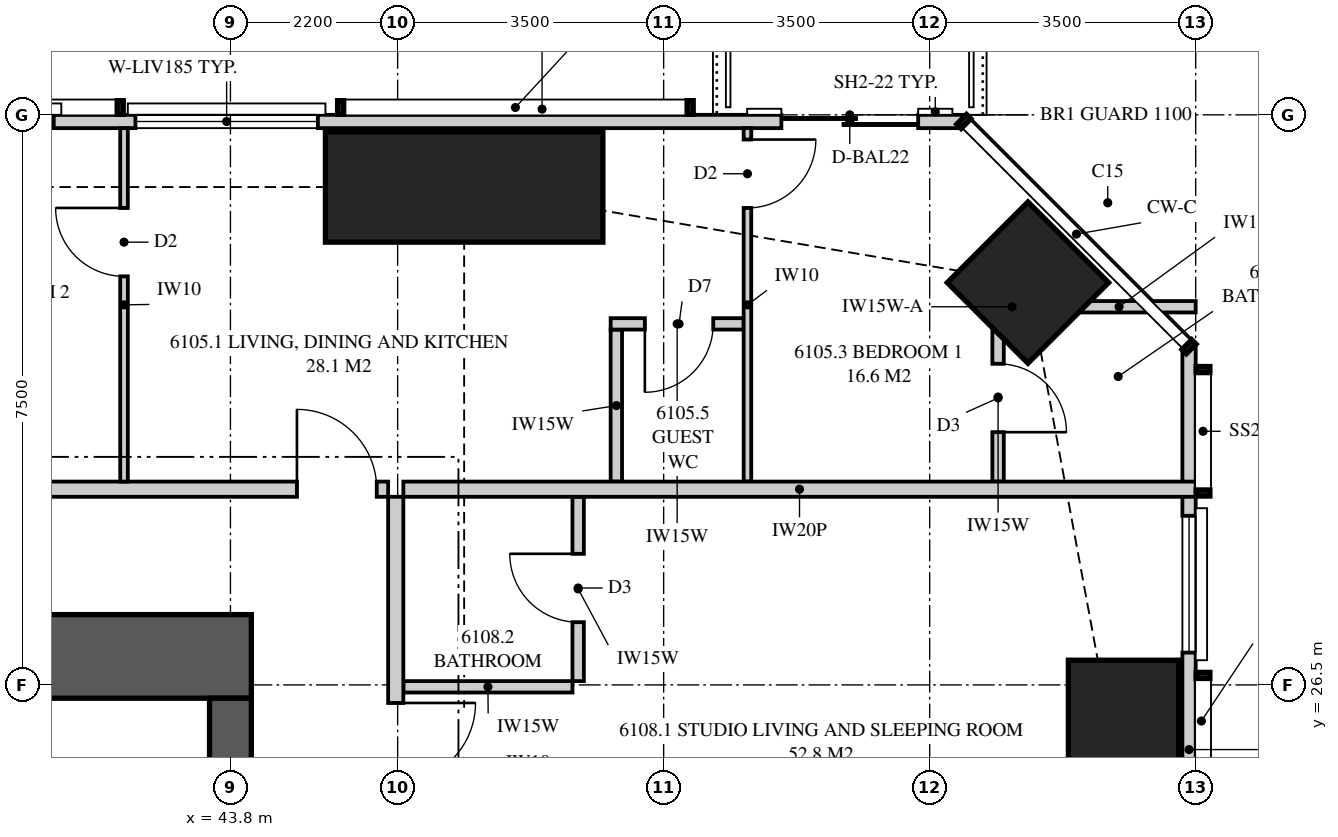
"""IFC4 building model, lengths in metres.
Left out: names, types, materials, properties, quantities, classifications, styles, units other than length and angle.
Written with IfcOpenShell. Run it as: python <this file> out.ifc"""

import sys

from ifc_helpers import new_model, si_unit, direction, frame, frame_2d, origin, origin_2d, place, context, subcontext, project, spatial, polyline, rectangle, outline, extrude, element, fill, save


model = new_model("IFC4")
c1 = context("Model", 3, precision=1e-05, world=origin(), true_north=direction((0.0, 1.0)))
c2 = subcontext(c1, "Body", "Model", "MODEL_VIEW")
j1 = project(units=[si_unit("LENGTHUNIT", "METRE"), si_unit("PLANEANGLEUNIT", "RADIAN")], contexts=[c1])
p1 = place(None, origin())
s1 = spatial("IfcSite", under=j1, at=p1, CompositionType="ELEMENT")
p2 = place(p1, origin())
s2 = spatial("IfcBuilding", under=s1, at=p2, CompositionType="ELEMENT")
p3 = place(p2, frame((0.0, 0.0, 224.95)))
s3 = spatial("IfcBuildingStorey", under=s2, at=p3, CompositionType="ELEMENT", Elevation=224.95)
p4 = place(p3, frame((55.55, 25.0, 0.0), z_axis=(0.0, 0.0, 1.0), x_axis=(1.0, 0.0, 0.0)))
e1 = element("IfcColumn", 1, at=p4, inside=s3, PredefinedType="COLUMN", context=c2, shape_type="SweptSolid", body=[
    extrude(rectangle(XDim=1.45, YDim=3.65, at=origin_2d()), origin(), (0.0, 0.0, 1.0), 3.5),
])
p5 = place(p3, frame((54.293, 31.793, 0.0), z_axis=(0.0, 0.0, 1.0), x_axis=(0.707106781187, 0.707106781187, 0.0)))
e2 = element("IfcColumn", 2, at=p5, inside=s3, PredefinedType="COLUMN", context=c2, shape_type="SweptSolid", body=[
    extrude(rectangle(XDim=1.5, YDim=1.5, at=origin_2d()), origin(), (0.0, 0.0, 1.0), 3.5),
])
p6 = place(p3, frame((46.875, 33.05, 0.0), z_axis=(0.0, 0.0, 1.0), x_axis=(0.0, 1.0, 0.0)))
e3 = element("IfcColumn", 3, at=p6, inside=s3, PredefinedType="COLUMN", context=c2, shape_type="SweptSolid", body=[
    extrude(rectangle(XDim=1.45, YDim=3.65, at=origin_2d()), origin(), (0.0, 0.0, 1.0), 3.5),
])
p7 = place(p3, frame((44.075, 26.875, 0.0), z_axis=(0.0, 0.0, 1.0), x_axis=(-1.0, 0.0, 0.0)))
e4 = element("IfcWall", 4, at=p7, inside=s3, PredefinedType="SHEAR", context=c2, shape_type="SweptSolid", body=[
    extrude(rectangle(XDim=8.175, YDim=1.1, at=frame_2d((4.087, 0.0))), origin(), (0.0, 0.0, 1.0), 3.5),
])
p8 = place(p7, frame((5.575, 0.0, 0.0)))
e5 = element("IfcOpeningElement", 5, at=p8, cuts=e4, PredefinedType="OPENING", context=c2, shape_type="SweptSolid", body=[
    extrude(rectangle(XDim=0.9, YDim=2.1, at=frame_2d((0.45, 1.05))), frame((0.0, 0.56, 0.0), z_axis=(0.0, -1.0, 0.0), x_axis=(1.0, 0.0, 0.0)), (0.0, 0.0, 1.0), 1.12),
])
p9 = place(p3, frame((43.8, 19.3, 0.0), z_axis=(0.0, 0.0, 1.0), x_axis=(0.0, 1.0, 0.0)))
e6 = element("IfcWall", 6, at=p9, inside=s3, PredefinedType="SHEAR", context=c2, shape_type="SweptSolid", body=[
    extrude(rectangle(XDim=7.025, YDim=0.55, at=frame_2d((3.512, 0.0))), origin(), (0.0, 0.0, 1.0), 3.5),
])
p10 = place(p3, frame((56.413, 20.35, 0.0), z_axis=(0.0, 0.0, 1.0), x_axis=(0.0, 1.0, 0.0)))
e7 = element("IfcWall", 7, at=p10, inside=s3, PredefinedType="SOLIDWALL", context=c2, shape_type="SweptSolid", body=[
    extrude(outline(polyline([(0.0, 0.0), (10.599, 0.0), (10.599, 3.26), (4.858, 3.26), (4.858, 2.3), (4.793, 2.3), (4.793, 3.26), (4.65, 3.26), (4.65, 2.3), (0.0, 2.3), (0.0, 0.0)])), frame((0.0, 0.087, 0.0), z_axis=(0.0, -1.0, 0.0), x_axis=(1.0, 0.0, 0.0)), (0.0, 0.0, 1.0), 0.175),
])
p11 = place(p10, frame((6.575, 0.0, 0.4)))
e8 = element("IfcOpeningElement", 8, at=p11, cuts=e7, PredefinedType="OPENING", context=c2, shape_type="SweptSolid", body=[
    extrude(rectangle(XDim=1.8, YDim=1.85, at=frame_2d((0.9, 0.925))), frame((0.0, 0.097, 0.0), z_axis=(0.0, -1.0, 0.0), x_axis=(1.0, 0.0, 0.0)), (0.0, 0.0, 1.0), 0.195),
])
p12 = place(p3, frame((53.449, 33.913, 0.0), z_axis=(0.0, 0.0, 1.0), x_axis=(-1.0, 0.0, 0.0)))
e9 = element("IfcWall", 9, at=p12, inside=s3, PredefinedType="SOLIDWALL", context=c2, shape_type="SweptSolid", body=[
    extrude(outline(polyline([(0.0, 0.0), (33.597, 0.0), (33.597, 3.26), (26.039, 3.26), (26.039, 2.3), (25.955, 2.3), (25.955, 3.26), (25.824, 3.26), (25.824, 2.3), (6.574, 2.3), (6.574, 3.26), (6.442, 3.26), (6.442, 2.3), (6.359, 2.3), (6.359, 3.26), (0.0, 3.26), (0.0, 0.0)])), frame((0.0, 0.087, 0.0), z_axis=(0.0, -1.0, 0.0), x_axis=(1.0, 0.0, 0.0)), (0.0, 0.0, 1.0), 0.175),
])
p13 = place(p12, frame((0.6, 0.0, 0.0)))
e10 = element("IfcOpeningElement", 10, at=p13, cuts=e9, PredefinedType="OPENING", context=c2, shape_type="SweptSolid", body=[
    extrude(rectangle(XDim=1.8, YDim=2.25, at=frame_2d((0.9, 1.125))), frame((0.0, 0.097, 0.0), z_axis=(0.0, -1.0, 0.0), x_axis=(1.0, 0.0, 0.0)), (0.0, 0.0, 1.0), 0.195),
])
p14 = place(p12, frame((8.499, 0.0, 0.4)))
e11 = element("IfcOpeningElement", 11, at=p14, cuts=e9, PredefinedType="OPENING", context=c2, shape_type="SweptSolid", body=[
    extrude(rectangle(XDim=2.4, YDim=1.85, at=frame_2d((1.2, 0.925))), frame((0.0, 0.097, 0.0), z_axis=(0.0, -1.0, 0.0), x_axis=(1.0, 0.0, 0.0)), (0.0, 0.0, 1.0), 0.195),
])
p15 = place(p12, frame((11.974, 0.0, 0.4)))
e12 = element("IfcOpeningElement", 12, at=p15, cuts=e9, PredefinedType="OPENING", context=c2, shape_type="SweptSolid", body=[
    extrude(rectangle(XDim=1.8, YDim=1.85, at=frame_2d((0.9, 0.925))), frame((0.0, 0.097, 0.0), z_axis=(0.0, -1.0, 0.0), x_axis=(1.0, 0.0, 0.0)), (0.0, 0.0, 1.0), 0.195),
])
p16 = place(p12, frame((18.124, 0.0, 0.4)))
e13 = element("IfcOpeningElement", 13, at=p16, cuts=e9, PredefinedType="OPENING", context=c2, shape_type="SweptSolid", body=[
    extrude(rectangle(XDim=1.8, YDim=1.85, at=frame_2d((0.9, 0.925))), frame((0.0, 0.097, 0.0), z_axis=(0.0, -1.0, 0.0), x_axis=(1.0, 0.0, 0.0)), (0.0, 0.0, 1.0), 0.195),
])
p17 = place(p12, frame((21.249, 0.0, 0.4)))
e14 = element("IfcOpeningElement", 14, at=p17, cuts=e9, PredefinedType="OPENING", context=c2, shape_type="SweptSolid", body=[
    extrude(rectangle(XDim=1.8, YDim=1.85, at=frame_2d((0.9, 0.925))), frame((0.0, 0.097, 0.0), z_axis=(0.0, -1.0, 0.0), x_axis=(1.0, 0.0, 0.0)), (0.0, 0.0, 1.0), 0.195),
])
p18 = place(p12, frame((27.76, 0.0, 0.4)))
e15 = element("IfcOpeningElement", 15, at=p18, cuts=e9, PredefinedType="OPENING", context=c2, shape_type="SweptSolid", body=[
    extrude(rectangle(XDim=2.4, YDim=1.85, at=frame_2d((1.2, 0.925))), frame((0.0, 0.097, 0.0), z_axis=(0.0, -1.0, 0.0), x_axis=(1.0, 0.0, 0.0)), (0.0, 0.0, 1.0), 0.195),
])
p19 = place(p3, frame((38.8, 29.075, 0.0), z_axis=(0.0, 0.0, 1.0), x_axis=(1.0, 0.0, 0.0)))
e16 = element("IfcWall", 16, at=p19, inside=s3, PredefinedType="PARTITIONING", context=c2, shape_type="SweptSolid", body=[
    extrude(outline(polyline([(0.0, 0.0), (7.075, 0.0), (7.075, 3.26), (7.075, 2.66), (6.765, 2.66), (6.765, 3.26), (0.0, 3.26), (0.0, 0.0)])), frame((0.0, 0.1, 0.0), z_axis=(0.0, -1.0, 0.0), x_axis=(1.0, 0.0, 0.0)), (0.0, 0.0, 1.0), 0.2),
])
p20 = place(p19, frame((5.875, 0.0, 0.0)))
e17 = element("IfcOpeningElement", 17, at=p20, cuts=e16, PredefinedType="OPENING", context=c2, shape_type="SweptSolid", body=[
    extrude(rectangle(XDim=1.05, YDim=2.2, at=frame_2d((0.525, 1.1))), frame((0.0, 0.11, 0.0), z_axis=(0.0, -1.0, 0.0), x_axis=(1.0, 0.0, 0.0)), (0.0, 0.0, 1.0), 0.22),
])
p21 = place(p3, frame((53.975, 31.475, 0.0), z_axis=(0.0, 0.0, 1.0), x_axis=(1.0, 0.0, 0.0)))
e18 = element("IfcWall", 18, at=p21, inside=s3, PredefinedType="PLUMBINGWALL", context=c2, shape_type="SweptSolid", body=[
    extrude(rectangle(XDim=0.217, YDim=0.15, at=frame_2d((0.108, 0.0))), origin(), (0.0, 0.0, 1.0), 2.3),
])
p22 = place(p3, frame((54.483, 31.475, 0.0), z_axis=(0.0, 0.0, 1.0), x_axis=(1.0, 0.0, 0.0)))
e19 = element("IfcWall", 19, at=p22, inside=s3, PredefinedType="PLUMBINGWALL", context=c2, shape_type="SweptSolid", body=[
    extrude(outline(polyline([(0.768, 3.26), (0.768, 2.3), (0.407, 2.3), (0.396, 2.239), (0.0, 1.15), (0.396, 0.061), (0.407, 0.0), (2.017, 0.0), (2.017, 3.26), (0.768, 3.26)])), frame((0.0, 0.075, 0.0), z_axis=(0.0, -1.0, 0.0), x_axis=(1.0, 0.0, 0.0)), (0.0, 0.0, 1.0), 0.15),
])
p23 = place(p3, frame((53.9, 31.4, 0.0), z_axis=(0.0, 0.0, 1.0), x_axis=(0.0, -1.0, 0.0)))
e20 = element("IfcWall", 20, at=p23, inside=s3, PredefinedType="PLUMBINGWALL", context=c2, shape_type="SweptSolid", body=[
    extrude(outline(polyline([(0.0, 0.0), (2.225, 0.0), (2.225, 3.26), (2.225, 2.3), (0.438, 2.3), (0.0, 2.3), (0.0, 3.26), (0.0, 0.0)])), frame((0.0, 0.075, 0.0), z_axis=(0.0, -1.0, 0.0), x_axis=(1.0, 0.0, 0.0)), (0.0, 0.0, 1.0), 0.15),
])
p24 = place(p23, frame((0.675, 0.0, 0.0)))
e21 = element("IfcOpeningElement", 21, at=p24, cuts=e20, PredefinedType="OPENING", context=c2, shape_type="SweptSolid", body=[
    extrude(rectangle(XDim=0.9, YDim=2.1, at=frame_2d((0.45, 1.05))), frame((0.0, 0.085, 0.0), z_axis=(0.0, -1.0, 0.0), x_axis=(1.0, 0.0, 0.0)), (0.0, 0.0, 1.0), 0.17),
])
p25 = place(p3, frame((50.603, 33.825, 0.0), z_axis=(0.0, 0.0, 1.0), x_axis=(0.0, -1.0, 0.0)))
e22 = element("IfcWall", 22, at=p25, inside=s3, PredefinedType="PARTITIONING", context=c2, shape_type="SweptSolid", body=[
    extrude(outline(polyline([(0.0, 0.0), (4.65, 0.0), (4.65, 3.26), (2.279, 3.26), (2.279, 2.3), (0.534, 2.3), (0.534, 3.26), (0.0, 3.26), (0.0, 0.0)])), frame((0.0, 0.05, 0.0), z_axis=(0.0, -1.0, 0.0), x_axis=(1.0, 0.0, 0.0)), (0.0, 0.0, 1.0), 0.1),
])
p26 = place(p25, frame((0.15, 0.0, 0.0)))
e23 = element("IfcOpeningElement", 23, at=p26, cuts=e22, PredefinedType="OPENING", context=c2, shape_type="SweptSolid", body=[
    extrude(rectangle(XDim=0.9, YDim=2.1, at=frame_2d((0.45, 1.05))), frame((0.0, 0.06, 0.0), z_axis=(0.0, -1.0, 0.0), x_axis=(1.0, 0.0, 0.0)), (0.0, 0.0, 1.0), 0.12),
])
p27 = place(p3, frame((42.4, 33.825, 0.0), z_axis=(0.0, 0.0, 1.0), x_axis=(0.0, -1.0, 0.0)))
e24 = element("IfcWall", 24, at=p27, inside=s3, PredefinedType="PARTITIONING", context=c2, shape_type="SweptSolid", body=[
    extrude(outline(polyline([(0.0, 0.0), (4.65, 0.0), (4.65, 3.26), (1.635, 3.26), (1.635, 2.3), (0.0, 2.3), (0.0, 3.26), (0.0, 0.0)])), frame((0.0, 0.05, 0.0), z_axis=(0.0, -1.0, 0.0), x_axis=(1.0, 0.0, 0.0)), (0.0, 0.0, 1.0), 0.1),
])
p28 = place(p27, frame((1.05, 0.0, 0.0)))
e25 = element("IfcOpeningElement", 25, at=p28, cuts=e24, PredefinedType="OPENING", context=c2, shape_type="SweptSolid", body=[
    extrude(rectangle(XDim=0.9, YDim=2.1, at=frame_2d((0.45, 1.05))), frame((0.0, 0.06, 0.0), z_axis=(0.0, -1.0, 0.0), x_axis=(1.0, 0.0, 0.0)), (0.0, 0.0, 1.0), 0.12),
])
p29 = place(p3, frame((46.075, 29.075, 0.0), z_axis=(0.0, 0.0, 1.0), x_axis=(1.0, 0.0, 0.0)))
e26 = element("IfcWall", 26, at=p29, inside=s3, PredefinedType="PARTITIONING", context=c2, shape_type="SweptSolid", body=[
    extrude(outline(polyline([(0.0, 0.0), (10.425, 0.0), (10.425, 3.26), (9.646, 3.26), (9.646, 2.3), (7.795, 2.3), (7.795, 3.26), (2.11, 3.26), (2.11, 2.66), (0.0, 2.66), (0.0, 3.26), (0.0, 0.0)])), frame((0.0, 0.1, 0.0), z_axis=(0.0, -1.0, 0.0), x_axis=(1.0, 0.0, 0.0)), (0.0, 0.0, 1.0), 0.2),
])
p30 = place(p3, frame((45.975, 25.0, 0.0), z_axis=(0.0, 0.0, 1.0), x_axis=(0.0, 1.0, 0.0)))
e27 = element("IfcWall", 27, at=p30, inside=s3, PredefinedType="PARTITIONING", context=c2, shape_type="SweptSolid", body=[
    extrude(rectangle(XDim=3.975, YDim=0.2, at=frame_2d((1.988, 0.0))), origin(), (0.0, 0.0, 1.0), 2.66),
])
p31 = place(p30, frame((0.212, 0.0, 0.0)))
e28 = element("IfcOpeningElement", 28, at=p31, cuts=e27, PredefinedType="OPENING", context=c2, shape_type="SweptSolid", body=[
    extrude(rectangle(XDim=1.05, YDim=2.2, at=frame_2d((0.525, 1.1))), frame((0.0, 0.11, 0.0), z_axis=(0.0, -1.0, 0.0), x_axis=(1.0, 0.0, 0.0)), (0.0, 0.0, 1.0), 0.22),
])
p32 = place(p3, frame((48.375, 26.55, 0.0), z_axis=(0.0, 0.0, 1.0), x_axis=(0.0, 1.0, 0.0)))
e29 = element("IfcWall", 29, at=p32, inside=s3, PredefinedType="PLUMBINGWALL", context=c2, shape_type="SweptSolid", body=[
    extrude(rectangle(XDim=2.425, YDim=0.15, at=frame_2d((1.212, 0.0))), origin(), (0.0, 0.0, 1.0), 3.26),
])
p33 = place(p32, frame((0.775, 0.0, 0.0)))
e30 = element("IfcOpeningElement", 30, at=p33, cuts=e29, PredefinedType="OPENING", context=c2, shape_type="SweptSolid", body=[
    extrude(rectangle(XDim=0.9, YDim=2.1, at=frame_2d((0.45, 1.05))), frame((0.0, 0.085, 0.0), z_axis=(0.0, -1.0, 0.0), x_axis=(1.0, 0.0, 0.0)), (0.0, 0.0, 1.0), 0.17),
])
p34 = place(p3, frame((48.3, 26.475, 0.0), z_axis=(0.0, 0.0, 1.0), x_axis=(-1.0, 0.0, 0.0)))
e31 = element("IfcWall", 31, at=p34, inside=s3, PredefinedType="PLUMBINGWALL", context=c2, shape_type="SweptSolid", body=[
    extrude(outline(polyline([(0.0, 0.0), (2.225, 0.0), (2.225, 3.26), (2.225, 2.66), (0.14, 2.66), (0.14, 3.26), (0.0, 3.26), (0.0, 0.0)])), frame((0.0, 0.075, 0.0), z_axis=(0.0, -1.0, 0.0), x_axis=(1.0, 0.0, 0.0)), (0.0, 0.0, 1.0), 0.15),
])
p35 = place(p3, frame((50.552, 31.25, 0.0), z_axis=(0.0, 0.0, 1.0), x_axis=(-1.0, 0.0, 0.0)))
e32 = element("IfcWall", 32, at=p35, inside=s3, PredefinedType="PLUMBINGWALL", context=c2, shape_type="SweptSolid", body=[
    extrude(rectangle(XDim=1.75, YDim=0.15, at=frame_2d((0.875, 0.0))), origin(), (0.0, 0.0, 1.0), 3.26),
])
p36 = place(p35, frame((0.4, 0.0, 0.0)))
e33 = element("IfcOpeningElement", 33, at=p36, cuts=e32, PredefinedType="OPENING", context=c2, shape_type="SweptSolid", body=[
    extrude(rectangle(XDim=0.9, YDim=2.1, at=frame_2d((0.45, 1.05))), frame((0.0, 0.085, 0.0), z_axis=(0.0, -1.0, 0.0), x_axis=(1.0, 0.0, 0.0)), (0.0, 0.0, 1.0), 0.17),
])
p37 = place(p3, frame((48.877, 29.175, 0.0), z_axis=(0.0, 0.0, 1.0), x_axis=(0.0, 1.0, 0.0)))
e34 = element("IfcWall", 34, at=p37, inside=s3, PredefinedType="PLUMBINGWALL", context=c2, shape_type="SweptSolid", body=[
    extrude(rectangle(XDim=2.0, YDim=0.15, at=frame_2d((1.0, 0.0))), origin(), (0.0, 0.0, 1.0), 3.26),
])
p38 = place(p11, origin())
e35 = element("IfcWindow", 35, at=p38, inside=s3, PartitioningType="SINGLE_PANEL", PredefinedType="WINDOW", context=c2, shape_type="SweptSolid", body=[
    extrude(rectangle(XDim=1.8, YDim=1.85, at=frame_2d((0.9, 0.925))), frame((0.0, 0.03, 0.0), z_axis=(0.0, -1.0, 0.0), x_axis=(1.0, 0.0, 0.0)), (0.0, 0.0, 1.0), 0.06),
])
fill(e8, e35)
p39 = place(p13, origin())
e36 = element("IfcDoor", 36, at=p39, inside=s3, OperationType="SLIDING_TO_LEFT", PredefinedType="DOOR", context=c2, shape_type="SweptSolid", body=[
    extrude(rectangle(XDim=1.8, YDim=2.25, at=frame_2d((0.9, 1.125))), frame((0.0, 0.025, 0.0), z_axis=(0.0, -1.0, 0.0), x_axis=(1.0, 0.0, 0.0)), (0.0, 0.0, 1.0), 0.05),
])
fill(e10, e36)
p40 = place(p14, origin())
e37 = element("IfcWindow", 37, at=p40, inside=s3, PartitioningType="SINGLE_PANEL", PredefinedType="WINDOW", context=c2, shape_type="SweptSolid", body=[
    extrude(rectangle(XDim=2.4, YDim=1.85, at=frame_2d((1.2, 0.925))), frame((0.0, 0.03, 0.0), z_axis=(0.0, -1.0, 0.0), x_axis=(1.0, 0.0, 0.0)), (0.0, 0.0, 1.0), 0.06),
])
fill(e11, e37)
p41 = place(p15, origin())
e38 = element("IfcWindow", 38, at=p41, inside=s3, PartitioningType="SINGLE_PANEL", PredefinedType="WINDOW", context=c2, shape_type="SweptSolid", body=[
    extrude(rectangle(XDim=1.8, YDim=1.85, at=frame_2d((0.9, 0.925))), frame((0.0, 0.03, 0.0), z_axis=(0.0, -1.0, 0.0), x_axis=(1.0, 0.0, 0.0)), (0.0, 0.0, 1.0), 0.06),
])
fill(e12, e38)
p42 = place(p20, origin())
e39 = element("IfcDoor", 39, at=p42, inside=s3, OperationType="SINGLE_SWING_LEFT", PredefinedType="DOOR", context=c2, shape_type="SweptSolid", body=[
    extrude(rectangle(XDim=1.05, YDim=2.2, at=frame_2d((0.525, 1.1))), frame((0.0, 0.025, 0.0), z_axis=(0.0, -1.0, 0.0), x_axis=(1.0, 0.0, 0.0)), (0.0, 0.0, 1.0), 0.05),
])
fill(e17, e39)
p43 = place(p24, origin())
e40 = element("IfcDoor", 40, at=p43, inside=s3, OperationType="SINGLE_SWING_RIGHT", PredefinedType="DOOR", context=c2, shape_type="SweptSolid", body=[
    extrude(rectangle(XDim=0.9, YDim=2.1, at=frame_2d((0.45, 1.05))), frame((0.0, 0.025, 0.0), z_axis=(0.0, -1.0, 0.0), x_axis=(1.0, 0.0, 0.0)), (0.0, 0.0, 1.0), 0.05),
])
fill(e21, e40)
p44 = place(p26, origin())
e41 = element("IfcDoor", 41, at=p44, inside=s3, OperationType="SINGLE_SWING_LEFT", PredefinedType="DOOR", context=c2, shape_type="SweptSolid", body=[
    extrude(rectangle(XDim=0.9, YDim=2.1, at=frame_2d((0.45, 1.05))), frame((0.0, 0.025, 0.0), z_axis=(0.0, -1.0, 0.0), x_axis=(1.0, 0.0, 0.0)), (0.0, 0.0, 1.0), 0.05),
])
fill(e23, e41)
p45 = place(p28, frame((0.9, 0.0, 0.0), z_axis=(0.0, 0.0, 1.0), x_axis=(-1.0, 0.0, 0.0)))
e42 = element("IfcDoor", 42, at=p45, inside=s3, OperationType="SINGLE_SWING_RIGHT", PredefinedType="DOOR", context=c2, shape_type="SweptSolid", body=[
    extrude(rectangle(XDim=0.9, YDim=2.1, at=frame_2d((0.45, 1.05))), frame((0.0, 0.025, 0.0), z_axis=(0.0, -1.0, 0.0), x_axis=(1.0, 0.0, 0.0)), (0.0, 0.0, 1.0), 0.05),
])
fill(e25, e42)
p46 = place(p31, frame((1.05, 0.0, 0.0), z_axis=(0.0, 0.0, 1.0), x_axis=(-1.0, 0.0, 0.0)))
e43 = element("IfcDoor", 43, at=p46, inside=s3, OperationType="SINGLE_SWING_LEFT", PredefinedType="DOOR", context=c2, shape_type="SweptSolid", body=[
    extrude(rectangle(XDim=1.05, YDim=2.2, at=frame_2d((0.525, 1.1))), frame((0.0, 0.025, 0.0), z_axis=(0.0, -1.0, 0.0), x_axis=(1.0, 0.0, 0.0)), (0.0, 0.0, 1.0), 0.05),
])
fill(e28, e43)
p47 = place(p33, origin())
e44 = element("IfcDoor", 44, at=p47, inside=s3, OperationType="SINGLE_SWING_RIGHT", PredefinedType="DOOR", context=c2, shape_type="SweptSolid", body=[
    extrude(rectangle(XDim=0.9, YDim=2.1, at=frame_2d((0.45, 1.05))), frame((0.0, 0.025, 0.0), z_axis=(0.0, -1.0, 0.0), x_axis=(1.0, 0.0, 0.0)), (0.0, 0.0, 1.0), 0.05),
])
fill(e30, e44)
p48 = place(p36, origin())
e45 = element("IfcDoor", 45, at=p48, inside=s3, OperationType="SINGLE_SWING_RIGHT", PredefinedType="DOOR", context=c2, shape_type="SweptSolid", body=[
    extrude(rectangle(XDim=0.9, YDim=2.1, at=frame_2d((0.45, 1.05))), frame((0.0, 0.025, 0.0), z_axis=(0.0, -1.0, 0.0), x_axis=(1.0, 0.0, 0.0)), (0.0, 0.0, 1.0), 0.05),
])
fill(e33, e45)
save(model, sys.argv[1])
